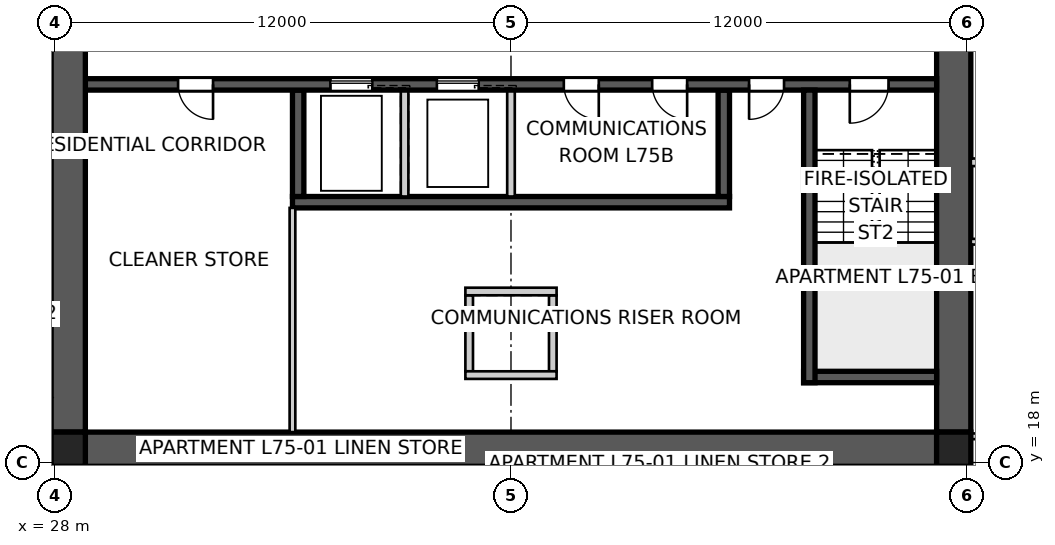
"""IFC4 building model, lengths in metres.
Left out: names, types, materials, properties, quantities, classifications, styles, units other than length and angle.
Written with IfcOpenShell. Run it as: python <this file> out.ifc"""

import sys

from ifc_helpers import new_model, si_unit, direction, frame, frame_2d, origin, origin_2d, place, context, subcontext, project, spatial, polyline, rectangle, outline, extrude, element, fill, save


model = new_model("IFC4")
c1 = context("Model", 3, precision=1e-05, world=origin(), true_north=direction((0.0, 1.0)))
c2 = subcontext(c1, "Body", "Model", "MODEL_VIEW")
j1 = project(units=[si_unit("LENGTHUNIT", "METRE"), si_unit("PLANEANGLEUNIT", "RADIAN")], contexts=[c1])
p1 = place(None, origin())
s1 = spatial("IfcSite", under=j1, at=p1, CompositionType="ELEMENT")
p2 = place(p1, origin())
s2 = spatial("IfcBuilding", under=s1, at=p2, CompositionType="ELEMENT")
p3 = place(p2, frame((0.0, 0.0, 272.6)))
s3 = spatial("IfcBuildingStorey", under=s2, at=p3, CompositionType="ELEMENT", Elevation=272.6)
p4 = place(p3, frame((51.2, 18.35, 0.0), z_axis=(0.0, 0.0, 1.0), x_axis=(-1.0, 0.0, 0.0)))
e1 = element("IfcWall", 1, at=p4, inside=s3, PredefinedType="SHEAR", context=c2, shape_type="SweptSolid", body=[
    extrude(outline(polyline([(0.0, -0.45), (22.4, -0.45), (22.4, -0.025), (22.85, -0.025), (22.85, 0.025), (22.4, 0.025), (22.4, 0.45), (0.0, 0.45), (0.0, 0.025), (-0.45, 0.025), (-0.45, -0.025), (0.0, -0.025), (0.0, -0.45)])), origin(), (0.0, 0.0, 1.0), 3.4),
])
p5 = place(p3, frame((51.65, 18.8, 0.0), z_axis=(0.0, 0.0, 1.0), x_axis=(0.0, 1.0, 0.0)))
e2 = element("IfcWall", 2, at=p5, inside=s3, PredefinedType="SHEAR", context=c2, shape_type="SweptSolid", body=[
    extrude(outline(polyline([(0.0, -0.45), (22.4, -0.45), (22.4, -0.025), (22.85, -0.025), (22.85, 0.025), (22.4, 0.025), (22.4, 0.45), (0.0, 0.45), (0.0, 0.025), (-0.45, 0.025), (-0.45, -0.025), (0.0, -0.025), (0.0, -0.45)])), origin(), (0.0, 0.0, 1.0), 3.4),
])
p6 = place(p5, frame((11.14, 0.0, 0.0)))
e3 = element("IfcOpeningElement", 3, at=p6, cuts=e2, PredefinedType="OPENING", context=c2, shape_type="SweptSolid", body=[
    extrude(rectangle(XDim=1.02, YDim=2.4, at=frame_2d((0.51, 1.2))), frame((0.0, 0.46, 0.0), z_axis=(0.0, -1.0, 0.0), x_axis=(1.0, 0.0, 0.0)), (0.0, 0.0, 1.0), 0.92),
])
p7 = place(p3, frame((28.35, 41.2, 0.0), z_axis=(0.0, 0.0, 1.0), x_axis=(0.0, -1.0, 0.0)))
e4 = element("IfcWall", 4, at=p7, inside=s3, PredefinedType="SHEAR", context=c2, shape_type="SweptSolid", body=[
    extrude(outline(polyline([(0.0, -0.45), (22.4, -0.45), (22.4, -0.025), (22.85, -0.025), (22.85, 0.025), (22.4, 0.025), (22.4, 0.45), (0.0, 0.45), (0.0, 0.025), (-0.45, 0.025), (-0.45, -0.025), (0.0, -0.025), (0.0, -0.45)])), origin(), (0.0, 0.0, 1.0), 3.4),
])
p8 = place(p7, frame((11.14, 0.0, 0.0)))
e5 = element("IfcOpeningElement", 5, at=p8, cuts=e4, PredefinedType="OPENING", context=c2, shape_type="SweptSolid", body=[
    extrude(rectangle(XDim=1.02, YDim=2.4, at=frame_2d((0.51, 1.2))), frame((0.0, 0.46, 0.0), z_axis=(0.0, -1.0, 0.0), x_axis=(1.0, 0.0, 0.0)), (0.0, 0.0, 1.0), 0.92),
])
p9 = place(p3, frame((51.2, 27.95, 0.0), z_axis=(0.0, 0.0, 1.0), x_axis=(-1.0, 0.0, 0.0)))
e6 = element("IfcWall", 6, at=p9, inside=s3, PredefinedType="SHEAR", context=c2, shape_type="SweptSolid", body=[
    extrude(rectangle(XDim=22.4, YDim=0.3, at=frame_2d((11.2, 0.0))), origin(), (0.0, 0.0, 1.0), 3.4),
])
p10 = place(p9, frame((19.04, 0.0, 0.0)))
e7 = element("IfcOpeningElement", 7, at=p10, cuts=e6, PredefinedType="OPENING", context=c2, shape_type="SweptSolid", body=[
    extrude(rectangle(XDim=0.92, YDim=2.1, at=frame_2d((0.46, 1.05))), frame((0.0, 0.16, 0.0), z_axis=(0.0, -1.0, 0.0), x_axis=(1.0, 0.0, 0.0)), (0.0, 0.0, 1.0), 0.32),
])
p11 = place(p9, frame((1.265, 0.0, 0.0)))
e8 = element("IfcOpeningElement", 8, at=p11, cuts=e6, PredefinedType="OPENING", context=c2, shape_type="SweptSolid", body=[
    extrude(rectangle(XDim=1.02, YDim=2.1, at=frame_2d((0.51, 1.05))), frame((0.0, 0.16, 0.0), z_axis=(0.0, -1.0, 0.0), x_axis=(1.0, 0.0, 0.0)), (0.0, 0.0, 1.0), 0.32),
])
p12 = place(p9, frame((4.015, 0.0, 0.0)))
e9 = element("IfcOpeningElement", 9, at=p12, cuts=e6, PredefinedType="OPENING", context=c2, shape_type="SweptSolid", body=[
    extrude(rectangle(XDim=0.92, YDim=2.1, at=frame_2d((0.46, 1.05))), frame((0.0, 0.16, 0.0), z_axis=(0.0, -1.0, 0.0), x_axis=(1.0, 0.0, 0.0)), (0.0, 0.0, 1.0), 0.32),
])
p13 = place(p9, frame((8.89, 0.0, 0.0)))
e10 = element("IfcOpeningElement", 10, at=p13, cuts=e6, PredefinedType="OPENING", context=c2, shape_type="SweptSolid", body=[
    extrude(rectangle(XDim=0.92, YDim=2.1, at=frame_2d((0.46, 1.05))), frame((0.0, 0.16, 0.0), z_axis=(0.0, -1.0, 0.0), x_axis=(1.0, 0.0, 0.0)), (0.0, 0.0, 1.0), 0.32),
])
p14 = place(p9, frame((6.565, 0.0, 0.0)))
e11 = element("IfcOpeningElement", 11, at=p14, cuts=e6, PredefinedType="OPENING", context=c2, shape_type="SweptSolid", body=[
    extrude(rectangle(XDim=0.92, YDim=2.1, at=frame_2d((0.46, 1.05))), frame((0.0, 0.16, 0.0), z_axis=(0.0, -1.0, 0.0), x_axis=(1.0, 0.0, 0.0)), (0.0, 0.0, 1.0), 0.32),
])
p15 = place(p9, frame((12.05, 0.0, 0.0)))
e12 = element("IfcOpeningElement", 12, at=p15, cuts=e6, PredefinedType="OPENING", context=c2, shape_type="SweptSolid", body=[
    extrude(rectangle(XDim=1.1, YDim=2.1, at=frame_2d((0.55, 1.05))), frame((0.0, 0.16, 0.0), z_axis=(0.0, -1.0, 0.0), x_axis=(1.0, 0.0, 0.0)), (0.0, 0.0, 1.0), 0.32),
])
p16 = place(p9, frame((14.85, 0.0, 0.0)))
e13 = element("IfcOpeningElement", 13, at=p16, cuts=e6, PredefinedType="OPENING", context=c2, shape_type="SweptSolid", body=[
    extrude(rectangle(XDim=1.1, YDim=2.1, at=frame_2d((0.55, 1.05))), frame((0.0, 0.16, 0.0), z_axis=(0.0, -1.0, 0.0), x_axis=(1.0, 0.0, 0.0)), (0.0, 0.0, 1.0), 0.32),
])
p17 = place(p3, frame((45.75, 24.85, 0.0), z_axis=(0.0, 0.0, 1.0), x_axis=(-1.0, 0.0, 0.0)))
e14 = element("IfcWall", 14, at=p17, inside=s3, PredefinedType="SHEAR", context=c2, shape_type="SweptSolid", body=[
    extrude(rectangle(XDim=11.5, YDim=0.3, at=frame_2d((5.75, 0.0))), origin(), (0.0, 0.0, 1.0), 3.4),
])
p18 = place(p3, frame((45.6, 27.8, 0.0), z_axis=(0.0, 0.0, 1.0), x_axis=(0.0, -1.0, 0.0)))
e15 = element("IfcWall", 15, at=p18, inside=s3, PredefinedType="SHEAR", context=c2, shape_type="SweptSolid", body=[
    extrude(rectangle(XDim=2.8, YDim=0.3, at=frame_2d((1.4, 0.0))), origin(), (0.0, 0.0, 1.0), 3.4),
])
for number, where, z_axis, x_axis in (
    (16, (40.0, 27.8, 0.0), (0.0, 0.0, 1.0), (0.0, -1.0, 0.0)),
    (17, (37.2, 27.8, 0.0), (0.0, 0.0, 1.0), (0.0, -1.0, 0.0)),
):
    element("IfcWall", number, at=place(p3, frame(where, z_axis=z_axis, x_axis=x_axis)), inside=s3, PredefinedType="SOLIDWALL", context=c2, shape_type="SweptSolid", body=[
        extrude(rectangle(XDim=2.8, YDim=0.2, at=frame_2d((1.4, 0.0))), origin(), (0.0, 0.0, 1.0), 3.4),
    ])
p19 = place(p3, frame((34.4, 27.8, 0.0), z_axis=(0.0, 0.0, 1.0), x_axis=(0.0, -1.0, 0.0)))
e18 = element("IfcWall", 18, at=p19, inside=s3, PredefinedType="SHEAR", context=c2, shape_type="SweptSolid", body=[
    extrude(rectangle(XDim=2.8, YDim=0.3, at=frame_2d((1.4, 0.0))), origin(), (0.0, 0.0, 1.0), 3.4),
])
p20 = place(p3, frame((47.85, 27.8, 0.0), z_axis=(0.0, 0.0, 1.0), x_axis=(0.0, -1.0, 0.0)))
e19 = element("IfcWall", 19, at=p20, inside=s3, PredefinedType="SHEAR", context=c2, shape_type="SweptSolid", body=[
    extrude(rectangle(XDim=7.7, YDim=0.3, at=frame_2d((3.85, 0.0))), origin(), (0.0, 0.0, 1.0), 3.4),
])
p21 = place(p3, frame((51.2, 20.25, 0.0), z_axis=(0.0, 0.0, 1.0), x_axis=(-1.0, 0.0, 0.0)))
e20 = element("IfcWall", 20, at=p21, inside=s3, PredefinedType="SHEAR", context=c2, shape_type="SweptSolid", body=[
    extrude(rectangle(XDim=3.5, YDim=0.3, at=frame_2d((1.75, 0.0))), origin(), (0.0, 0.0, 1.0), 3.4),
])
for number, where, z_axis, x_axis in (
    (21, (38.9, 22.4, 0.0), (0.0, 0.0, 1.0), (0.0, -1.0, 0.0)),
    (22, (41.1, 22.4, 0.0), (0.0, 0.0, 1.0), (0.0, -1.0, 0.0)),
):
    element("IfcWall", number, at=place(p3, frame(where, z_axis=z_axis, x_axis=x_axis)), inside=s3, PredefinedType="SOLIDWALL", context=c2, shape_type="SweptSolid", body=[
        extrude(rectangle(XDim=2.0, YDim=0.2, at=frame_2d((1.0, 0.0))), origin(), (0.0, 0.0, 1.0), 3.4),
    ])
for number, where, z_axis, x_axis in (
    (23, (38.8, 22.5, 0.0), (0.0, 0.0, 1.0), (1.0, 0.0, 0.0)),
    (24, (38.8, 20.3, 0.0), (0.0, 0.0, 1.0), (1.0, 0.0, 0.0)),
):
    element("IfcWall", number, at=place(p3, frame(where, z_axis=z_axis, x_axis=x_axis)), inside=s3, PredefinedType="SOLIDWALL", context=c2, shape_type="SweptSolid", body=[
        extrude(rectangle(XDim=2.4, YDim=0.2, at=frame_2d((1.2, 0.0))), origin(), (0.0, 0.0, 1.0), 3.4),
    ])
for number, where, z_axis, x_axis in (
    (25, (28.35, 18.35, 0.0), (0.0, 0.0, 1.0), (1.0, 0.0, 0.0)),
    (26, (51.65, 18.35, 0.0), (0.0, 0.0, 1.0), (1.0, 0.0, 0.0)),
):
    element("IfcColumn", number, at=place(p3, frame(where, z_axis=z_axis, x_axis=x_axis)), inside=s3, PredefinedType="COLUMN", context=c2, shape_type="SweptSolid", body=[
        extrude(rectangle(XDim=0.9, YDim=0.9, at=origin_2d()), origin(), (0.0, 0.0, 1.0), 3.4),
    ])
p22 = place(p3, frame((52.1, 25.9, 0.0), z_axis=(0.0, 0.0, 1.0), x_axis=(1.0, 0.0, 0.0)))
e27 = element("IfcWall", 27, at=p22, inside=s3, PredefinedType="PARTITIONING", context=c2, shape_type="SweptSolid", body=[
    extrude(rectangle(XDim=2.5, YDim=0.2, at=frame_2d((1.25, 0.0))), origin(), (0.0, 0.0, 1.0), 3.25),
])
p23 = place(p3, frame((24.296, 16.823, 0.0), z_axis=(0.0, 0.0, 1.0), x_axis=(0.76603440109, 0.64279957712, 0.0)))
e28 = element("IfcWall", 28, at=p23, inside=s3, PredefinedType="PARTITIONING", context=c2, shape_type="SweptSolid", body=[
    extrude(rectangle(XDim=4.64, YDim=0.25, at=frame_2d((2.32, 0.0))), origin(), (0.0, 0.0, 1.0), 3.25),
])
p24 = place(p3, frame((34.25, 18.8, 0.0), z_axis=(0.0, 0.0, 1.0), x_axis=(0.0, 1.0, 0.0)))
e29 = element("IfcWall", 29, at=p24, inside=s3, PredefinedType="SOLIDWALL", context=c2, shape_type="SweptSolid", body=[
    extrude(rectangle(XDim=5.9, YDim=0.15, at=frame_2d((2.95, 0.0))), origin(), (0.0, 0.0, 1.0), 3.25),
])
p25 = place(p3, frame((57.0, 23.81, 0.0), z_axis=(0.0, 0.0, 1.0), x_axis=(-1.0, 0.0, 0.0)))
e30 = element("IfcWall", 30, at=p25, inside=s3, PredefinedType="SOLIDWALL", context=c2, shape_type="SweptSolid", body=[
    extrude(rectangle(XDim=4.9, YDim=0.15, at=frame_2d((2.45, 0.0))), origin(), (0.0, 0.0, 1.0), 3.25),
])
p26 = place(p25, frame((1.97, 0.0, 0.0)))
e31 = element("IfcOpeningElement", 31, at=p26, cuts=e30, PredefinedType="OPENING", context=c2, shape_type="SweptSolid", body=[
    extrude(rectangle(XDim=0.96, YDim=2.1, at=frame_2d((0.48, 1.05))), frame((0.0, 0.085, 0.0), z_axis=(0.0, -1.0, 0.0), x_axis=(1.0, 0.0, 0.0)), (0.0, 0.0, 1.0), 0.17),
])
p27 = place(p3, frame((51.18, 18.689, 0.0), z_axis=(0.0, 0.0, 1.0), x_axis=(1.0, 0.0, 0.0)))
e32 = element("IfcWall", 32, at=p27, inside=s3, PredefinedType="SOLIDWALL", context=c2, shape_type="SweptSolid", body=[
    extrude(rectangle(XDim=5.82, YDim=0.15, at=frame_2d((2.91, 0.0))), origin(), (0.0, 0.0, 1.0), 3.25),
])
p28 = place(p27, frame((2.91, 0.0, 0.0)))
e33 = element("IfcOpeningElement", 33, at=p28, cuts=e32, PredefinedType="OPENING", context=c2, shape_type="SweptSolid", body=[
    extrude(rectangle(XDim=0.92, YDim=2.1, at=frame_2d((0.46, 1.05))), frame((0.0, 0.085, 0.0), z_axis=(0.0, -1.0, 0.0), x_axis=(1.0, 0.0, 0.0)), (0.0, 0.0, 1.0), 0.17),
])
p29 = place(p10, origin())
e34 = element("IfcDoor", 34, at=p29, inside=s3, OperationType="SINGLE_SWING_LEFT", PredefinedType="DOOR", context=c2, shape_type="SweptSolid", body=[
    extrude(rectangle(XDim=0.92, YDim=2.1, at=frame_2d((0.46, 1.05))), frame((0.0, 0.025, 0.0), z_axis=(0.0, -1.0, 0.0), x_axis=(1.0, 0.0, 0.0)), (0.0, 0.0, 1.0), 0.05),
])
fill(e7, e34)
p30 = place(p11, origin())
e35 = element("IfcDoor", 35, at=p30, inside=s3, OperationType="SINGLE_SWING_RIGHT", PredefinedType="DOOR", context=c2, shape_type="SweptSolid", body=[
    extrude(rectangle(XDim=1.02, YDim=2.1, at=frame_2d((0.51, 1.05))), frame((0.0, 0.025, 0.0), z_axis=(0.0, -1.0, 0.0), x_axis=(1.0, 0.0, 0.0)), (0.0, 0.0, 1.0), 0.05),
])
fill(e8, e35)
p31 = place(p12, origin())
e36 = element("IfcDoor", 36, at=p31, inside=s3, OperationType="SINGLE_SWING_RIGHT", PredefinedType="DOOR", context=c2, shape_type="SweptSolid", body=[
    extrude(rectangle(XDim=0.92, YDim=2.1, at=frame_2d((0.46, 1.05))), frame((0.0, 0.025, 0.0), z_axis=(0.0, -1.0, 0.0), x_axis=(1.0, 0.0, 0.0)), (0.0, 0.0, 1.0), 0.05),
])
fill(e9, e36)
p32 = place(p13, origin())
e37 = element("IfcDoor", 37, at=p32, inside=s3, OperationType="SINGLE_SWING_LEFT", PredefinedType="DOOR", context=c2, shape_type="SweptSolid", body=[
    extrude(rectangle(XDim=0.92, YDim=2.1, at=frame_2d((0.46, 1.05))), frame((0.0, 0.025, 0.0), z_axis=(0.0, -1.0, 0.0), x_axis=(1.0, 0.0, 0.0)), (0.0, 0.0, 1.0), 0.05),
])
fill(e10, e37)
p33 = place(p14, origin())
e38 = element("IfcDoor", 38, at=p33, inside=s3, OperationType="SINGLE_SWING_LEFT", PredefinedType="DOOR", context=c2, shape_type="SweptSolid", body=[
    extrude(rectangle(XDim=0.92, YDim=2.1, at=frame_2d((0.46, 1.05))), frame((0.0, 0.025, 0.0), z_axis=(0.0, -1.0, 0.0), x_axis=(1.0, 0.0, 0.0)), (0.0, 0.0, 1.0), 0.05),
])
fill(e11, e38)
p34 = place(p15, origin())
e39 = element("IfcDoor", 39, at=p34, inside=s3, OperationType="SLIDING_TO_LEFT", PredefinedType="DOOR", context=c2, shape_type="SweptSolid", body=[
    extrude(rectangle(XDim=1.1, YDim=2.1, at=frame_2d((0.55, 1.05))), frame((0.0, 0.025, 0.0), z_axis=(0.0, -1.0, 0.0), x_axis=(1.0, 0.0, 0.0)), (0.0, 0.0, 1.0), 0.05),
])
fill(e12, e39)
p35 = place(p16, origin())
e40 = element("IfcDoor", 40, at=p35, inside=s3, OperationType="SLIDING_TO_LEFT", PredefinedType="DOOR", context=c2, shape_type="SweptSolid", body=[
    extrude(rectangle(XDim=1.1, YDim=2.1, at=frame_2d((0.55, 1.05))), frame((0.0, 0.025, 0.0), z_axis=(0.0, -1.0, 0.0), x_axis=(1.0, 0.0, 0.0)), (0.0, 0.0, 1.0), 0.05),
])
fill(e13, e40)
save(model, sys.argv[1])
